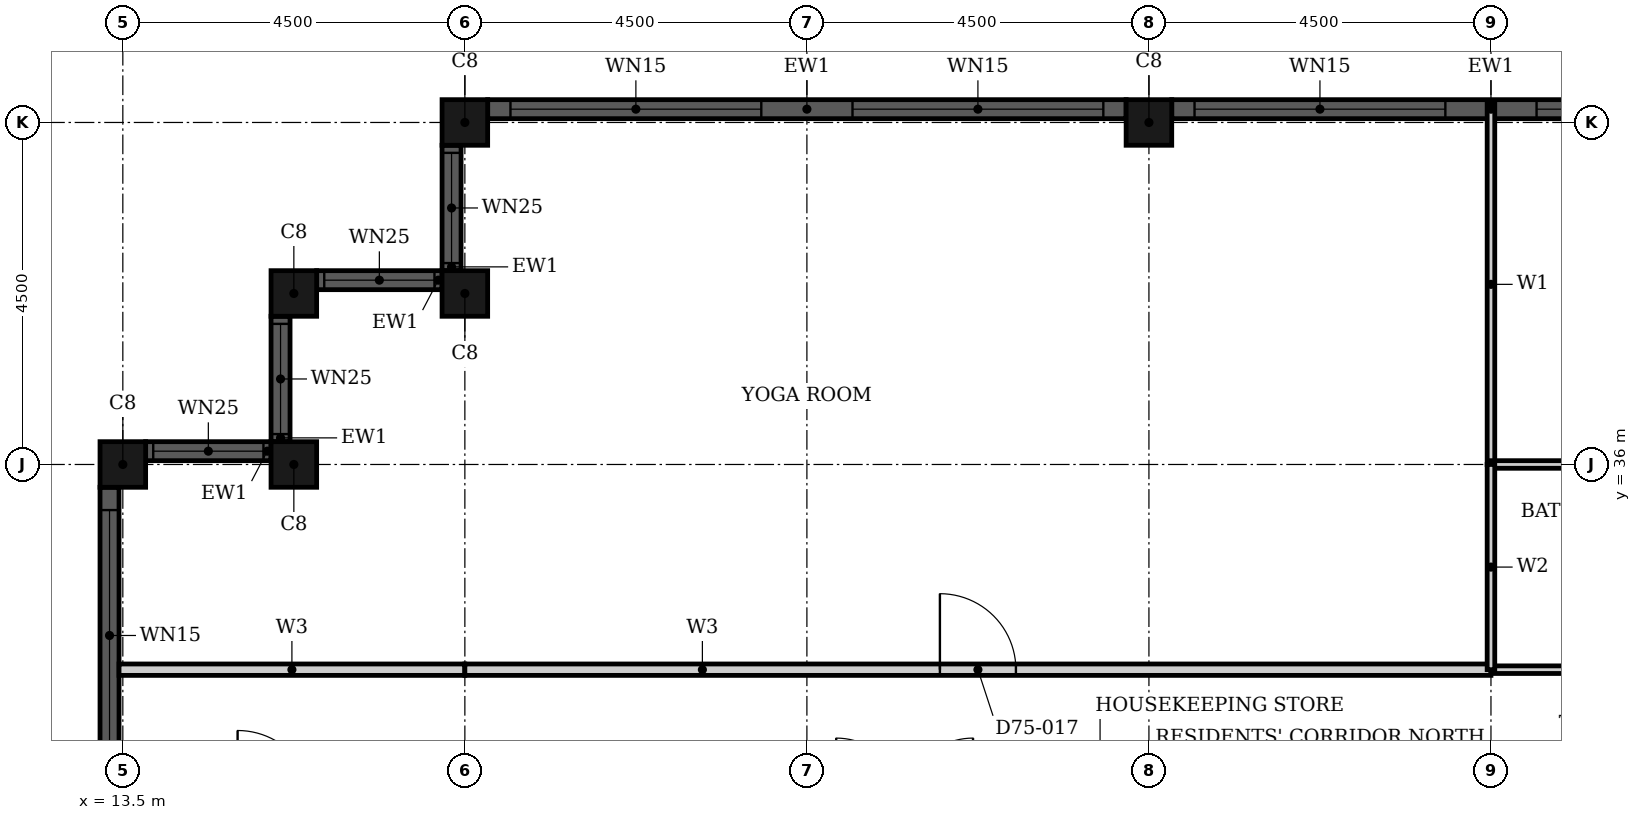
"""IFC4 building model, lengths in metres.
Left out: names, types, materials, properties, quantities, classifications, styles, units other than length and angle.
Written with IfcOpenShell. Run it as: python <this file> out.ifc"""

import sys

from ifc_helpers import new_model, si_unit, direction, frame, frame_2d, origin, origin_2d, place, context, subcontext, project, spatial, rectangle, hollow_rectangle, extrude, element, fill, save


model = new_model("IFC4")
c1 = context("Model", 3, precision=1e-05, world=origin(), true_north=direction((0.0, 1.0)))
c2 = subcontext(c1, "Body", "Model", "MODEL_VIEW")
j1 = project(units=[si_unit("LENGTHUNIT", "METRE"), si_unit("PLANEANGLEUNIT", "RADIAN")], contexts=[c1])
p1 = place(None, origin())
s1 = spatial("IfcSite", under=j1, at=p1, CompositionType="ELEMENT")
p2 = place(p1, origin())
s2 = spatial("IfcBuilding", under=s1, at=p2, CompositionType="ELEMENT")
p3 = place(p2, frame((0.0, 0.0, 294.5)))
s3 = spatial("IfcBuildingStorey", under=s2, at=p3, CompositionType="ELEMENT", Elevation=294.5)
for number, where, z_axis, x_axis in (
    (1, (27.0, 40.5, 0.0), (0.0, 0.0, 1.0), (1.0, 0.0, 0.0)),
    (2, (18.0, 40.5, 0.0), (0.0, 0.0, 1.0), (1.0, 0.0, 0.0)),
    (3, (18.0, 38.25, 0.0), (0.0, 0.0, 1.0), (1.0, 0.0, 0.0)),
    (4, (15.75, 38.25, 0.0), (0.0, 0.0, 1.0), (1.0, 0.0, 0.0)),
    (5, (15.75, 36.0, 0.0), (0.0, 0.0, 1.0), (1.0, 0.0, 0.0)),
    (6, (13.5, 36.0, 0.0), (0.0, 0.0, 1.0), (1.0, 0.0, 0.0)),
):
    element("IfcColumn", number, at=place(p3, frame(where, z_axis=z_axis, x_axis=x_axis)), inside=s3, PredefinedType="COLUMN", context=c2, shape_type="SweptSolid", body=[
        extrude(hollow_rectangle(XDim=0.6, YDim=0.6, WallThickness=0.02, at=origin_2d()), origin(), (0.0, 0.0, 1.0), 3.7),
    ])
p4 = place(p3, frame((35.7, 40.675, 0.0), z_axis=(0.0, 0.0, 1.0), x_axis=(-1.0, 0.0, 0.0)))
e7 = element("IfcWall", 7, at=p4, inside=s3, PredefinedType="SOLIDWALL", context=c2, shape_type="SweptSolid", body=[
    extrude(rectangle(XDim=8.4, YDim=0.25, at=frame_2d((4.2, 0.0))), origin(), (0.0, 0.0, 1.0), 3.7),
])
p5 = place(p4, frame((0.3, 0.0, 0.45)))
e8 = element("IfcOpeningElement", 8, at=p5, cuts=e7, PredefinedType="OPENING", context=c2, shape_type="SweptSolid", body=[
    extrude(rectangle(XDim=3.3, YDim=2.3, at=frame_2d((1.65, 1.15))), frame((0.0, 0.135, 0.0), z_axis=(0.0, -1.0, 0.0), x_axis=(1.0, 0.0, 0.0)), (0.0, 0.0, 1.0), 0.27),
])
p6 = place(p4, frame((4.8, 0.0, 0.45)))
e9 = element("IfcOpeningElement", 9, at=p6, cuts=e7, PredefinedType="OPENING", context=c2, shape_type="SweptSolid", body=[
    extrude(rectangle(XDim=3.3, YDim=2.3, at=frame_2d((1.65, 1.15))), frame((0.0, 0.135, 0.0), z_axis=(0.0, -1.0, 0.0), x_axis=(1.0, 0.0, 0.0)), (0.0, 0.0, 1.0), 0.27),
])
p7 = place(p3, frame((26.7, 40.675, 0.0), z_axis=(0.0, 0.0, 1.0), x_axis=(-1.0, 0.0, 0.0)))
e10 = element("IfcWall", 10, at=p7, inside=s3, PredefinedType="SOLIDWALL", context=c2, shape_type="SweptSolid", body=[
    extrude(rectangle(XDim=8.4, YDim=0.25, at=frame_2d((4.2, 0.0))), origin(), (0.0, 0.0, 1.0), 3.7),
])
p8 = place(p7, frame((0.3, 0.0, 0.45)))
e11 = element("IfcOpeningElement", 11, at=p8, cuts=e10, PredefinedType="OPENING", context=c2, shape_type="SweptSolid", body=[
    extrude(rectangle(XDim=3.3, YDim=2.3, at=frame_2d((1.65, 1.15))), frame((0.0, 0.135, 0.0), z_axis=(0.0, -1.0, 0.0), x_axis=(1.0, 0.0, 0.0)), (0.0, 0.0, 1.0), 0.27),
])
p9 = place(p7, frame((4.8, 0.0, 0.45)))
e12 = element("IfcOpeningElement", 12, at=p9, cuts=e10, PredefinedType="OPENING", context=c2, shape_type="SweptSolid", body=[
    extrude(rectangle(XDim=3.3, YDim=2.3, at=frame_2d((1.65, 1.15))), frame((0.0, 0.135, 0.0), z_axis=(0.0, -1.0, 0.0), x_axis=(1.0, 0.0, 0.0)), (0.0, 0.0, 1.0), 0.27),
])
p10 = place(p3, frame((17.825, 40.2, 0.0), z_axis=(0.0, 0.0, 1.0), x_axis=(0.0, -1.0, 0.0)))
e13 = element("IfcWall", 13, at=p10, inside=s3, PredefinedType="SOLIDWALL", context=c2, shape_type="SweptSolid", body=[
    extrude(rectangle(XDim=1.65, YDim=0.25, at=frame_2d((0.825, 0.0))), origin(), (0.0, 0.0, 1.0), 3.7),
])
p11 = place(p10, frame((0.1, 0.0, 0.9)))
e14 = element("IfcOpeningElement", 14, at=p11, cuts=e13, PredefinedType="OPENING", context=c2, shape_type="SweptSolid", body=[
    extrude(rectangle(XDim=1.45, YDim=1.85, at=frame_2d((0.725, 0.925))), frame((0.0, 0.135, 0.0), z_axis=(0.0, -1.0, 0.0), x_axis=(1.0, 0.0, 0.0)), (0.0, 0.0, 1.0), 0.27),
])
p12 = place(p3, frame((17.7, 38.425, 0.0), z_axis=(0.0, 0.0, 1.0), x_axis=(-1.0, 0.0, 0.0)))
e15 = element("IfcWall", 15, at=p12, inside=s3, PredefinedType="SOLIDWALL", context=c2, shape_type="SweptSolid", body=[
    extrude(rectangle(XDim=1.65, YDim=0.25, at=frame_2d((0.825, 0.0))), origin(), (0.0, 0.0, 1.0), 3.7),
])
p13 = place(p12, frame((0.1, 0.0, 0.9)))
e16 = element("IfcOpeningElement", 16, at=p13, cuts=e15, PredefinedType="OPENING", context=c2, shape_type="SweptSolid", body=[
    extrude(rectangle(XDim=1.45, YDim=1.85, at=frame_2d((0.725, 0.925))), frame((0.0, 0.135, 0.0), z_axis=(0.0, -1.0, 0.0), x_axis=(1.0, 0.0, 0.0)), (0.0, 0.0, 1.0), 0.27),
])
p14 = place(p3, frame((15.575, 37.95, 0.0), z_axis=(0.0, 0.0, 1.0), x_axis=(0.0, -1.0, 0.0)))
e17 = element("IfcWall", 17, at=p14, inside=s3, PredefinedType="SOLIDWALL", context=c2, shape_type="SweptSolid", body=[
    extrude(rectangle(XDim=1.65, YDim=0.25, at=frame_2d((0.825, 0.0))), origin(), (0.0, 0.0, 1.0), 3.7),
])
p15 = place(p14, frame((0.1, 0.0, 0.9)))
e18 = element("IfcOpeningElement", 18, at=p15, cuts=e17, PredefinedType="OPENING", context=c2, shape_type="SweptSolid", body=[
    extrude(rectangle(XDim=1.45, YDim=1.85, at=frame_2d((0.725, 0.925))), frame((0.0, 0.135, 0.0), z_axis=(0.0, -1.0, 0.0), x_axis=(1.0, 0.0, 0.0)), (0.0, 0.0, 1.0), 0.27),
])
p16 = place(p3, frame((15.45, 36.175, 0.0), z_axis=(0.0, 0.0, 1.0), x_axis=(-1.0, 0.0, 0.0)))
e19 = element("IfcWall", 19, at=p16, inside=s3, PredefinedType="SOLIDWALL", context=c2, shape_type="SweptSolid", body=[
    extrude(rectangle(XDim=1.65, YDim=0.25, at=frame_2d((0.825, 0.0))), origin(), (0.0, 0.0, 1.0), 3.7),
])
p17 = place(p16, frame((0.1, 0.0, 0.9)))
e20 = element("IfcOpeningElement", 20, at=p17, cuts=e19, PredefinedType="OPENING", context=c2, shape_type="SweptSolid", body=[
    extrude(rectangle(XDim=1.45, YDim=1.85, at=frame_2d((0.725, 0.925))), frame((0.0, 0.135, 0.0), z_axis=(0.0, -1.0, 0.0), x_axis=(1.0, 0.0, 0.0)), (0.0, 0.0, 1.0), 0.27),
])
p18 = place(p3, frame((13.325, 35.7, 0.0), z_axis=(0.0, 0.0, 1.0), x_axis=(0.0, -1.0, 0.0)))
e21 = element("IfcWall", 21, at=p18, inside=s3, PredefinedType="SOLIDWALL", context=c2, shape_type="SweptSolid", body=[
    extrude(rectangle(XDim=8.4, YDim=0.25, at=frame_2d((4.2, 0.0))), origin(), (0.0, 0.0, 1.0), 3.7),
])
p19 = place(p18, frame((0.3, 0.0, 0.45)))
e22 = element("IfcOpeningElement", 22, at=p19, cuts=e21, PredefinedType="OPENING", context=c2, shape_type="SweptSolid", body=[
    extrude(rectangle(XDim=3.3, YDim=2.3, at=frame_2d((1.65, 1.15))), frame((0.0, 0.135, 0.0), z_axis=(0.0, -1.0, 0.0), x_axis=(1.0, 0.0, 0.0)), (0.0, 0.0, 1.0), 0.27),
])
p20 = place(p18, frame((4.8, 0.0, 0.45)))
e23 = element("IfcOpeningElement", 23, at=p20, cuts=e21, PredefinedType="OPENING", context=c2, shape_type="SweptSolid", body=[
    extrude(rectangle(XDim=3.3, YDim=2.3, at=frame_2d((1.65, 1.15))), frame((0.0, 0.135, 0.0), z_axis=(0.0, -1.0, 0.0), x_axis=(1.0, 0.0, 0.0)), (0.0, 0.0, 1.0), 0.27),
])
p21 = place(p3, frame((13.45, 33.3, 0.0), z_axis=(0.0, 0.0, 1.0), x_axis=(1.0, 0.0, 0.0)))
e24 = element("IfcWall", 24, at=p21, inside=s3, PredefinedType="PARTITIONING", context=c2, shape_type="SweptSolid", body=[
    extrude(rectangle(XDim=4.549, YDim=0.15, at=frame_2d((2.274, 0.0))), origin(), (0.0, 0.0, 1.0), 3.4),
])
p22 = place(p3, frame((18.0, 33.3, 0.0), z_axis=(0.0, 0.0, 1.0), x_axis=(1.0, 0.0, 0.0)))
e25 = element("IfcWall", 25, at=p22, inside=s3, PredefinedType="PARTITIONING", context=c2, shape_type="SweptSolid", body=[
    extrude(rectangle(XDim=13.5, YDim=0.15, at=frame_2d((6.75, 0.0))), origin(), (0.0, 0.0, 1.0), 3.4),
])
p23 = place(p22, frame((6.25, 0.0, 0.0)))
e26 = element("IfcOpeningElement", 26, at=p23, cuts=e25, PredefinedType="OPENING", context=c2, shape_type="SweptSolid", body=[
    extrude(rectangle(XDim=1.0, YDim=2.1, at=frame_2d((0.5, 1.05))), frame((0.0, 0.085, 0.0), z_axis=(0.0, -1.0, 0.0), x_axis=(1.0, 0.0, 0.0)), (0.0, 0.0, 1.0), 0.17),
])
p24 = place(p3, frame((31.5, 36.0, 0.0), z_axis=(0.0, 0.0, 1.0), x_axis=(0.0, 1.0, 0.0)))
e27 = element("IfcWall", 27, at=p24, inside=s3, PredefinedType="PARTITIONING", context=c2, shape_type="SweptSolid", body=[
    extrude(rectangle(XDim=4.74, YDim=0.1, at=frame_2d((2.37, 0.0))), origin(), (0.0, 0.0, 1.0), 3.4),
])
for number, where, z_axis, x_axis in (
    (28, (31.5, 33.3, 0.0), (0.0, 0.0, 1.0), (1.0, 0.0, 0.0)),
    (29, (31.5, 36.0, 0.0), (0.0, 0.0, 1.0), (1.0, 0.0, 0.0)),
):
    element("IfcWall", number, at=place(p3, frame(where, z_axis=z_axis, x_axis=x_axis)), inside=s3, PredefinedType="PARTITIONING", context=c2, shape_type="SweptSolid", body=[
        extrude(rectangle(XDim=2.4, YDim=0.1, at=frame_2d((1.2, 0.0))), origin(), (0.0, 0.0, 1.0), 3.4),
    ])
p25 = place(p3, frame((31.5, 33.3, 0.0), z_axis=(0.0, 0.0, 1.0), x_axis=(0.0, 1.0, 0.0)))
e30 = element("IfcWall", 30, at=p25, inside=s3, PredefinedType="PARTITIONING", context=c2, shape_type="SweptSolid", body=[
    extrude(rectangle(XDim=2.7, YDim=0.1, at=frame_2d((1.35, 0.0))), origin(), (0.0, 0.0, 1.0), 3.4),
])
p26 = place(p5, origin())
e31 = element("IfcWindow", 31, at=p26, inside=s3, PartitioningType="SINGLE_PANEL", PredefinedType="WINDOW", context=c2, shape_type="SweptSolid", body=[
    extrude(rectangle(XDim=3.3, YDim=2.3, at=frame_2d((1.65, 1.15))), frame((0.0, 0.03, 0.0), z_axis=(0.0, -1.0, 0.0), x_axis=(1.0, 0.0, 0.0)), (0.0, 0.0, 1.0), 0.06),
])
fill(e8, e31)
p27 = place(p6, origin())
e32 = element("IfcWindow", 32, at=p27, inside=s3, PartitioningType="SINGLE_PANEL", PredefinedType="WINDOW", context=c2, shape_type="SweptSolid", body=[
    extrude(rectangle(XDim=3.3, YDim=2.3, at=frame_2d((1.65, 1.15))), frame((0.0, 0.03, 0.0), z_axis=(0.0, -1.0, 0.0), x_axis=(1.0, 0.0, 0.0)), (0.0, 0.0, 1.0), 0.06),
])
fill(e9, e32)
p28 = place(p8, origin())
e33 = element("IfcWindow", 33, at=p28, inside=s3, PartitioningType="SINGLE_PANEL", PredefinedType="WINDOW", context=c2, shape_type="SweptSolid", body=[
    extrude(rectangle(XDim=3.3, YDim=2.3, at=frame_2d((1.65, 1.15))), frame((0.0, 0.03, 0.0), z_axis=(0.0, -1.0, 0.0), x_axis=(1.0, 0.0, 0.0)), (0.0, 0.0, 1.0), 0.06),
])
fill(e11, e33)
p29 = place(p9, origin())
e34 = element("IfcWindow", 34, at=p29, inside=s3, PartitioningType="SINGLE_PANEL", PredefinedType="WINDOW", context=c2, shape_type="SweptSolid", body=[
    extrude(rectangle(XDim=3.3, YDim=2.3, at=frame_2d((1.65, 1.15))), frame((0.0, 0.03, 0.0), z_axis=(0.0, -1.0, 0.0), x_axis=(1.0, 0.0, 0.0)), (0.0, 0.0, 1.0), 0.06),
])
fill(e12, e34)
p30 = place(p11, origin())
e35 = element("IfcWindow", 35, at=p30, inside=s3, PartitioningType="SINGLE_PANEL", PredefinedType="WINDOW", context=c2, shape_type="SweptSolid", body=[
    extrude(rectangle(XDim=1.45, YDim=1.85, at=frame_2d((0.725, 0.925))), frame((0.0, 0.03, 0.0), z_axis=(0.0, -1.0, 0.0), x_axis=(1.0, 0.0, 0.0)), (0.0, 0.0, 1.0), 0.06),
])
fill(e14, e35)
p31 = place(p13, origin())
e36 = element("IfcWindow", 36, at=p31, inside=s3, PartitioningType="SINGLE_PANEL", PredefinedType="WINDOW", context=c2, shape_type="SweptSolid", body=[
    extrude(rectangle(XDim=1.45, YDim=1.85, at=frame_2d((0.725, 0.925))), frame((0.0, 0.03, 0.0), z_axis=(0.0, -1.0, 0.0), x_axis=(1.0, 0.0, 0.0)), (0.0, 0.0, 1.0), 0.06),
])
fill(e16, e36)
p32 = place(p15, origin())
e37 = element("IfcWindow", 37, at=p32, inside=s3, PartitioningType="SINGLE_PANEL", PredefinedType="WINDOW", context=c2, shape_type="SweptSolid", body=[
    extrude(rectangle(XDim=1.45, YDim=1.85, at=frame_2d((0.725, 0.925))), frame((0.0, 0.03, 0.0), z_axis=(0.0, -1.0, 0.0), x_axis=(1.0, 0.0, 0.0)), (0.0, 0.0, 1.0), 0.06),
])
fill(e18, e37)
p33 = place(p17, origin())
e38 = element("IfcWindow", 38, at=p33, inside=s3, PartitioningType="SINGLE_PANEL", PredefinedType="WINDOW", context=c2, shape_type="SweptSolid", body=[
    extrude(rectangle(XDim=1.45, YDim=1.85, at=frame_2d((0.725, 0.925))), frame((0.0, 0.03, 0.0), z_axis=(0.0, -1.0, 0.0), x_axis=(1.0, 0.0, 0.0)), (0.0, 0.0, 1.0), 0.06),
])
fill(e20, e38)
p34 = place(p19, origin())
e39 = element("IfcWindow", 39, at=p34, inside=s3, PartitioningType="SINGLE_PANEL", PredefinedType="WINDOW", context=c2, shape_type="SweptSolid", body=[
    extrude(rectangle(XDim=3.3, YDim=2.3, at=frame_2d((1.65, 1.15))), frame((0.0, 0.03, 0.0), z_axis=(0.0, -1.0, 0.0), x_axis=(1.0, 0.0, 0.0)), (0.0, 0.0, 1.0), 0.06),
])
fill(e22, e39)
p35 = place(p23, origin())
e40 = element("IfcDoor", 40, at=p35, inside=s3, OperationType="SINGLE_SWING_LEFT", PredefinedType="DOOR", context=c2, shape_type="SweptSolid", body=[
    extrude(rectangle(XDim=1.0, YDim=2.1, at=frame_2d((0.5, 1.05))), frame((0.0, 0.025, 0.0), z_axis=(0.0, -1.0, 0.0), x_axis=(1.0, 0.0, 0.0)), (0.0, 0.0, 1.0), 0.05),
])
fill(e26, e40)
save(model, sys.argv[1])
